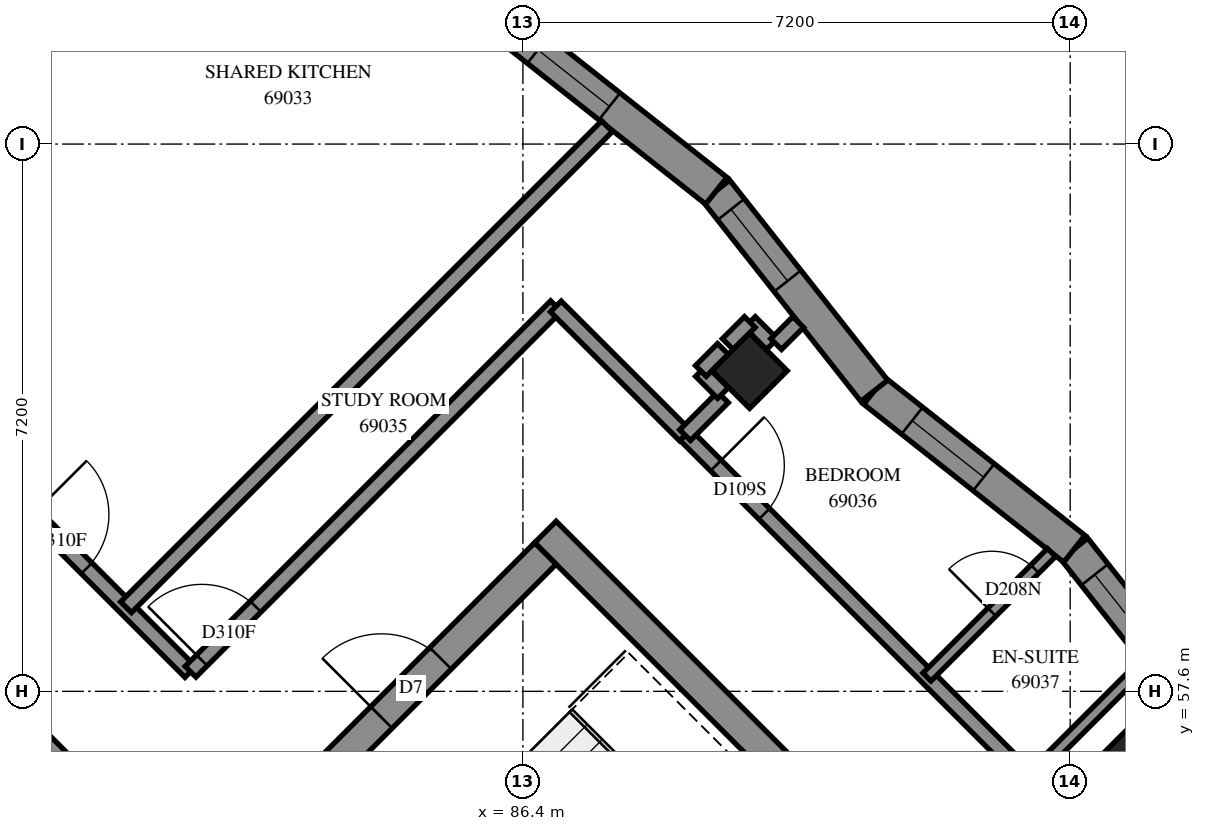
"""IFC4 building model, lengths in metres.
Left out: names, types, materials, properties, quantities, classifications, styles, units other than length and angle.
Written with IfcOpenShell. Run it as: python <this file> out.ifc"""

import sys

from ifc_helpers import new_model, si_unit, direction, frame, frame_2d, origin, origin_2d, place, context, subcontext, project, spatial, polyline, rectangle, outline, extrude, element, fill, save


model = new_model("IFC4")
c1 = context("Model", 3, precision=1e-05, world=origin(), true_north=direction((0.0, 1.0)))
c2 = subcontext(c1, "Body", "Model", "MODEL_VIEW")
j1 = project(units=[si_unit("LENGTHUNIT", "METRE"), si_unit("PLANEANGLEUNIT", "RADIAN")], contexts=[c1])
p1 = place(None, origin())
s1 = spatial("IfcSite", under=j1, at=p1, CompositionType="ELEMENT")
p2 = place(p1, origin())
s2 = spatial("IfcBuilding", under=s1, at=p2, CompositionType="ELEMENT")
p3 = place(p2, frame((0.0, 0.0, 254.0)))
s3 = spatial("IfcBuildingStorey", under=s2, at=p3, CompositionType="ELEMENT", Elevation=254.0)
for number, where, z_axis, x_axis in (
    (1, (89.382, 61.818, 0.0), (0.0, 0.0, 1.0), (0.707, -0.707, 0.0)),
    (2, (94.474, 56.727, 0.0), (0.0, 0.0, 1.0), (0.707, -0.707, 0.0)),
):
    element("IfcColumn", number, at=place(p3, frame(where, z_axis=z_axis, x_axis=x_axis)), inside=s3, PredefinedType="COLUMN", context=c2, shape_type="SweptSolid", body=[
        extrude(rectangle(XDim=0.7, YDim=0.7, at=origin_2d()), origin(), (0.0, 0.0, 1.0), 3.1),
    ])
p4 = place(p3, frame((86.695, 59.696, -0.3), z_axis=(0.0, 0.0, 1.0), x_axis=(0.7071100706, -0.7071034917, 0.0)))
e3 = element("IfcWall", 3, at=p4, inside=s3, PredefinedType="SHEAR", context=c2, shape_type="SweptSolid", body=[
    extrude(rectangle(XDim=15.2, YDim=0.4, at=frame_2d((7.6, 0.0))), origin(), (0.0, 0.0, 1.0), 2.7),
])
p5 = place(p4, frame((10.4, 0.0, 0.3)))
e4 = element("IfcOpeningElement", 4, at=p5, cuts=e3, PredefinedType="OPENING", context=c2, shape_type="SweptSolid", body=[
    extrude(rectangle(XDim=0.8, YDim=2.1, at=frame_2d((0.4, 1.05))), frame((0.0, 0.21, 0.0), z_axis=(0.0, -1.0, 0.0), x_axis=(1.0, 0.0, 0.0)), (0.0, 0.0, 1.0), 0.42),
])
p6 = place(p3, frame((76.513, 49.231, -0.3), z_axis=(0.0, 0.0, 1.0), x_axis=(0.7071067812, 0.7071067812, 0.0)))
e5 = element("IfcWall", 5, at=p6, inside=s3, PredefinedType="SHEAR", context=c2, shape_type="SweptSolid", body=[
    extrude(rectangle(XDim=14.4, YDim=0.4, at=frame_2d((7.2, 0.0))), origin(), (0.0, 0.0, 1.0), 2.7),
])
p7 = place(p6, frame((4.55, 0.0, 0.3)))
e6 = element("IfcOpeningElement", 6, at=p7, cuts=e5, PredefinedType="OPENING", context=c2, shape_type="SweptSolid", body=[
    extrude(rectangle(XDim=1.1, YDim=2.1, at=frame_2d((0.55, 1.05))), frame((0.0, 0.21, 0.0), z_axis=(0.0, -1.0, 0.0), x_axis=(1.0, 0.0, 0.0)), (0.0, 0.0, 1.0), 0.42),
])
p8 = place(p6, frame((11.35, 0.0, 0.3)))
e7 = element("IfcOpeningElement", 7, at=p8, cuts=e5, PredefinedType="OPENING", context=c2, shape_type="SweptSolid", body=[
    extrude(rectangle(XDim=1.1, YDim=2.1, at=frame_2d((0.55, 1.05))), frame((0.0, 0.21, 0.0), z_axis=(0.0, -1.0, 0.0), x_axis=(1.0, 0.0, 0.0)), (0.0, 0.0, 1.0), 0.42),
])
p9 = place(p3, frame((95.733, 56.844, 0.0), z_axis=(0.0, 0.0, 1.0), x_axis=(-0.6198356984, 0.7847316147, 0.0)))
e8 = element("IfcWall", 8, at=p9, inside=s3, PredefinedType="SOLIDWALL", context=c2, shape_type="SweptSolid", body=[
    extrude(outline(polyline([(0.026, -0.225), (3.38, -0.225), (3.327, 0.225), (-0.026, 0.225), (0.026, -0.225)])), origin(), (0.0, 0.0, 1.0), 3.1),
])
p10 = place(p9, frame((1.72, 0.0, 0.45)))
e9 = element("IfcOpeningElement", 9, at=p10, cuts=e8, PredefinedType="OPENING", context=c2, shape_type="SweptSolid", body=[
    extrude(rectangle(XDim=1.2, YDim=2.55, at=frame_2d((0.6, 1.275))), frame((0.0, 0.235, 0.0), z_axis=(0.0, -1.0, 0.0), x_axis=(1.0, 0.0, 0.0)), (0.0, 0.0, 1.0), 0.47),
])
p11 = place(p3, frame((93.654, 59.475, 0.0), z_axis=(0.0, 0.0, 1.0), x_axis=(-0.7847316147, 0.6198356984, 0.0)))
e10 = element("IfcWall", 10, at=p11, inside=s3, PredefinedType="SOLIDWALL", context=c2, shape_type="SweptSolid", body=[
    extrude(outline(polyline([(-0.026, -0.225), (3.327, -0.225), (3.38, 0.225), (0.026, 0.225), (-0.026, -0.225)])), origin(), (0.0, 0.0, 1.0), 3.1),
])
p12 = place(p11, frame((1.519, 0.0, 0.45)))
e11 = element("IfcOpeningElement", 11, at=p12, cuts=e10, PredefinedType="OPENING", context=c2, shape_type="SweptSolid", body=[
    extrude(rectangle(XDim=1.2, YDim=2.55, at=frame_2d((0.6, 1.275))), frame((0.0, 0.235, 0.0), z_axis=(0.0, -1.0, 0.0), x_axis=(1.0, 0.0, 0.0)), (0.0, 0.0, 1.0), 0.47),
])
p13 = place(p3, frame((91.023, 61.554, 0.0), z_axis=(0.0, 0.0, 1.0), x_axis=(-0.6198356984, 0.7847316147, 0.0)))
e12 = element("IfcWall", 12, at=p13, inside=s3, PredefinedType="SOLIDWALL", context=c2, shape_type="SweptSolid", body=[
    extrude(outline(polyline([(0.026, -0.225), (3.38, -0.225), (3.327, 0.225), (-0.026, 0.225), (0.026, -0.225)])), origin(), (0.0, 0.0, 1.0), 3.1),
])
p14 = place(p13, frame((1.841, 0.0, 0.45)))
e13 = element("IfcOpeningElement", 13, at=p14, cuts=e12, PredefinedType="OPENING", context=c2, shape_type="SweptSolid", body=[
    extrude(rectangle(XDim=1.2, YDim=2.55, at=frame_2d((0.6, 1.275))), frame((0.0, 0.235, 0.0), z_axis=(0.0, -1.0, 0.0), x_axis=(1.0, 0.0, 0.0)), (0.0, 0.0, 1.0), 0.47),
])
p15 = place(p3, frame((88.944, 64.186, 0.0), z_axis=(0.0, 0.0, 1.0), x_axis=(-0.7847316147, 0.6198356984, 0.0)))
e14 = element("IfcWall", 14, at=p15, inside=s3, PredefinedType="SOLIDWALL", context=c2, shape_type="SweptSolid", body=[
    extrude(outline(polyline([(-0.026, -0.225), (3.327, -0.225), (3.38, 0.225), (0.026, 0.225), (-0.026, -0.225)])), origin(), (0.0, 0.0, 1.0), 3.1),
])
p16 = place(p15, frame((1.79, 0.0, 0.45)))
e15 = element("IfcOpeningElement", 15, at=p16, cuts=e14, PredefinedType="OPENING", context=c2, shape_type="SweptSolid", body=[
    extrude(rectangle(XDim=1.2, YDim=2.55, at=frame_2d((0.6, 1.275))), frame((0.0, 0.235, 0.0), z_axis=(0.0, -1.0, 0.0), x_axis=(1.0, 0.0, 0.0)), (0.0, 0.0, 1.0), 0.47),
])
p17 = place(p3, frame((74.397, 65.483, 0.0), z_axis=(0.0, 0.0, 1.0), x_axis=(0.7071067812, -0.7071067812, 0.0)))
e16 = element("IfcWall", 16, at=p17, inside=s3, PredefinedType="PARTITIONING", context=c2, shape_type="SweptSolid", body=[
    extrude(rectangle(XDim=10.788, YDim=0.2, at=frame_2d((5.394, 0.0))), origin(), (0.0, 0.0, 1.0), 3.1),
])
p18 = place(p17, frame((5.083, 0.0, 0.0)))
e17 = element("IfcOpeningElement", 17, at=p18, cuts=e16, PredefinedType="OPENING", context=c2, shape_type="SweptSolid", body=[
    extrude(rectangle(XDim=1.0, YDim=2.1, at=frame_2d((0.5, 1.05))), frame((0.0, 0.11, 0.0), z_axis=(0.0, -1.0, 0.0), x_axis=(1.0, 0.0, 0.0)), (0.0, 0.0, 1.0), 0.22),
])
p19 = place(p17, frame((7.858, 0.0, 0.0)))
e18 = element("IfcOpeningElement", 18, at=p19, cuts=e16, PredefinedType="OPENING", context=c2, shape_type="SweptSolid", body=[
    extrude(rectangle(XDim=1.0, YDim=2.1, at=frame_2d((0.5, 1.05))), frame((0.0, 0.11, 0.0), z_axis=(0.0, -1.0, 0.0), x_axis=(1.0, 0.0, 0.0)), (0.0, 0.0, 1.0), 0.22),
])
p20 = place(p3, frame((81.179, 58.707, 0.0), z_axis=(0.0, 0.0, 1.0), x_axis=(0.7071123688, 0.7071011936, 0.0)))
e19 = element("IfcWall", 19, at=p20, inside=s3, PredefinedType="PARTITIONING", context=c2, shape_type="SweptSolid", body=[
    extrude(rectangle(XDim=8.948, YDim=0.2, at=frame_2d((4.474, 0.0))), origin(), (0.0, 0.0, 1.0), 3.1),
])
p21 = place(p3, frame((82.028, 57.858, 0.0), z_axis=(0.0, 0.0, 1.0), x_axis=(0.7071067812, 0.7071067812, 0.0)))
e20 = element("IfcWall", 20, at=p21, inside=s3, PredefinedType="PARTITIONING", context=c2, shape_type="SweptSolid", body=[
    extrude(rectangle(XDim=6.8, YDim=0.2, at=frame_2d((3.4, 0.0))), origin(), (0.0, 0.0, 1.0), 3.1),
])
p22 = place(p21, frame((0.211, 0.0, 0.0)))
e21 = element("IfcOpeningElement", 21, at=p22, cuts=e20, PredefinedType="OPENING", context=c2, shape_type="SweptSolid", body=[
    extrude(rectangle(XDim=1.0, YDim=2.1, at=frame_2d((0.5, 1.05))), frame((0.0, 0.11, 0.0), z_axis=(0.0, -1.0, 0.0), x_axis=(1.0, 0.0, 0.0)), (0.0, 0.0, 1.0), 0.22),
])
p23 = place(p3, frame((88.537, 60.973, 0.0), z_axis=(0.0, 0.0, 1.0), x_axis=(0.7071067812, -0.7071067812, 0.0)))
e22 = element("IfcWall", 22, at=p23, inside=s3, PredefinedType="PARTITIONING", context=c2, shape_type="SweptSolid", body=[
    extrude(rectangle(XDim=6.401, YDim=0.2, at=frame_2d((3.2, 0.0))), origin(), (0.0, 0.0, 1.0), 3.1),
])
p24 = place(p23, frame((0.569, 0.0, 0.0)))
e23 = element("IfcOpeningElement", 23, at=p24, cuts=e22, PredefinedType="OPENING", context=c2, shape_type="SweptSolid", body=[
    extrude(rectangle(XDim=0.9, YDim=2.1, at=frame_2d((0.45, 1.05))), frame((0.0, 0.11, 0.0), z_axis=(0.0, -1.0, 0.0), x_axis=(1.0, 0.0, 0.0)), (0.0, 0.0, 1.0), 0.22),
])
p25 = place(p3, frame((86.833, 62.663, 0.0), z_axis=(0.0, 0.0, 1.0), x_axis=(0.7075233388, -0.706689978, 0.0)))
e24 = element("IfcWall", 24, at=p25, inside=s3, PredefinedType="PARTITIONING", context=c2, shape_type="SweptSolid", body=[
    extrude(rectangle(XDim=2.4, YDim=0.2, at=frame_2d((1.2, 0.0))), origin(), (0.0, 0.0, 1.0), 3.1),
])
p26 = place(p3, frame((91.716, 57.788, 0.0), z_axis=(0.0, 0.0, 1.0), x_axis=(0.7070851944, 0.7071283673, 0.0)))
e25 = element("IfcWall", 25, at=p26, inside=s3, PredefinedType="PARTITIONING", context=c2, shape_type="SweptSolid", body=[
    extrude(rectangle(XDim=2.316, YDim=0.15, at=frame_2d((1.158, 0.0))), origin(), (0.0, 0.0, 1.0), 3.1),
])
p27 = place(p26, frame((1.209, 0.0, 0.0)))
e26 = element("IfcOpeningElement", 26, at=p27, cuts=e25, PredefinedType="OPENING", context=c2, shape_type="SweptSolid", body=[
    extrude(rectangle(XDim=0.8, YDim=2.1, at=frame_2d((0.4, 1.05))), frame((0.0, 0.085, 0.0), z_axis=(0.0, -1.0, 0.0), x_axis=(1.0, 0.0, 0.0)), (0.0, 0.0, 1.0), 0.17),
])
p28 = place(p3, frame((93.059, 56.445, 0.0), z_axis=(0.0, 0.0, 1.0), x_axis=(0.7071067812, 0.7071067812, 0.0)))
e27 = element("IfcWall", 27, at=p28, inside=s3, PredefinedType="PARTITIONING", context=c2, shape_type="SweptSolid", body=[
    extrude(rectangle(XDim=2.135, YDim=0.15, at=frame_2d((1.067, 0.0))), origin(), (0.0, 0.0, 1.0), 3.1),
])
p29 = place(p3, frame((79.547, 57.505, 0.0), z_axis=(0.0, 0.0, 1.0), x_axis=(0.7071067812, -0.7071067812, 0.0)))
e28 = element("IfcWall", 28, at=p29, inside=s3, PredefinedType="PARTITIONING", context=c2, shape_type="SweptSolid", body=[
    extrude(rectangle(XDim=1.505, YDim=0.2, at=frame_2d((0.752, 0.0))), origin(), (0.0, 0.0, 1.0), 3.1),
])
p30 = place(p3, frame((88.534, 60.971, 0.0), z_axis=(0.0, 0.0, 1.0), x_axis=(0.7071067812, 0.7071067812, 0.0)))
e29 = element("IfcWall", 29, at=p30, inside=s3, PredefinedType="PARTITIONING", context=c2, shape_type="SweptSolid", body=[
    extrude(rectangle(XDim=0.704, YDim=0.2, at=frame_2d((0.352, 0.0))), origin(), (0.0, 0.0, 1.0), 3.1),
])
for number, where, z_axis, x_axis in (
    (30, (88.743, 61.815, 0.0), (0.0, 0.0, 1.0), (0.707, -0.707, 0.0)),
    (31, (89.386, 62.458, 0.0), (0.0, 0.0, 1.0), (0.707, -0.707, 0.0)),
    (32, (88.741, 61.815, 0.0), (0.0, 0.0, 1.0), (0.707, 0.707, 0.0)),
    (33, (89.095, 62.169, 0.0), (0.0, 0.0, 1.0), (0.707, 0.707, 0.0)),
    (34, (89.731, 62.169, 0.0), (0.0, 0.0, 1.0), (0.707, 0.707, 0.0)),
):
    element("IfcWall", number, at=place(p3, frame(where, z_axis=z_axis, x_axis=x_axis)), inside=s3, PredefinedType="PARTITIONING", context=c2, shape_type="SweptSolid", body=[
        extrude(rectangle(XDim=0.41, YDim=0.2, at=frame_2d((0.205, 0.0))), origin(), (0.0, 0.0, 1.0), 3.1),
    ])
p31 = place(p10, origin())
e35 = element("IfcWindow", 35, at=p31, inside=s3, PartitioningType="SINGLE_PANEL", PredefinedType="WINDOW", context=c2, shape_type="SweptSolid", body=[
    extrude(rectangle(XDim=1.2, YDim=2.55, at=frame_2d((0.6, 1.275))), frame((0.0, 0.205, 0.0), z_axis=(0.0, -1.0, 0.0), x_axis=(1.0, 0.0, 0.0)), (0.0, 0.0, 1.0), 0.06),
])
fill(e9, e35)
p32 = place(p12, origin())
e36 = element("IfcWindow", 36, at=p32, inside=s3, PartitioningType="SINGLE_PANEL", PredefinedType="WINDOW", context=c2, shape_type="SweptSolid", body=[
    extrude(rectangle(XDim=1.2, YDim=2.55, at=frame_2d((0.6, 1.275))), frame((0.0, 0.205, 0.0), z_axis=(0.0, -1.0, 0.0), x_axis=(1.0, 0.0, 0.0)), (0.0, 0.0, 1.0), 0.06),
])
fill(e11, e36)
p33 = place(p14, origin())
e37 = element("IfcWindow", 37, at=p33, inside=s3, PartitioningType="SINGLE_PANEL", PredefinedType="WINDOW", context=c2, shape_type="SweptSolid", body=[
    extrude(rectangle(XDim=1.2, YDim=2.55, at=frame_2d((0.6, 1.275))), frame((0.0, 0.205, 0.0), z_axis=(0.0, -1.0, 0.0), x_axis=(1.0, 0.0, 0.0)), (0.0, 0.0, 1.0), 0.06),
])
fill(e13, e37)
p34 = place(p16, origin())
e38 = element("IfcWindow", 38, at=p34, inside=s3, PartitioningType="SINGLE_PANEL", PredefinedType="WINDOW", context=c2, shape_type="SweptSolid", body=[
    extrude(rectangle(XDim=1.2, YDim=2.55, at=frame_2d((0.6, 1.275))), frame((0.0, 0.205, 0.0), z_axis=(0.0, -1.0, 0.0), x_axis=(1.0, 0.0, 0.0)), (0.0, 0.0, 1.0), 0.06),
])
fill(e15, e38)
p35 = place(p8, origin())
e39 = element("IfcDoor", 39, at=p35, inside=s3, OperationType="SINGLE_SWING_LEFT", PredefinedType="DOOR", context=c2, shape_type="SweptSolid", body=[
    extrude(rectangle(XDim=1.1, YDim=2.1, at=frame_2d((0.55, 1.05))), frame((0.0, 0.025, 0.0), z_axis=(0.0, -1.0, 0.0), x_axis=(1.0, 0.0, 0.0)), (0.0, 0.0, 1.0), 0.05),
])
fill(e7, e39)
p36 = place(p19, origin())
e40 = element("IfcDoor", 40, at=p36, inside=s3, OperationType="SINGLE_SWING_LEFT", PredefinedType="DOOR", context=c2, shape_type="SweptSolid", body=[
    extrude(rectangle(XDim=1.0, YDim=2.1, at=frame_2d((0.5, 1.05))), frame((0.0, 0.025, 0.0), z_axis=(0.0, -1.0, 0.0), x_axis=(1.0, 0.0, 0.0)), (0.0, 0.0, 1.0), 0.05),
])
fill(e18, e40)
p37 = place(p22, origin())
e41 = element("IfcDoor", 41, at=p37, inside=s3, OperationType="SINGLE_SWING_RIGHT", PredefinedType="DOOR", context=c2, shape_type="SweptSolid", body=[
    extrude(rectangle(XDim=1.0, YDim=2.1, at=frame_2d((0.5, 1.05))), frame((0.0, 0.025, 0.0), z_axis=(0.0, -1.0, 0.0), x_axis=(1.0, 0.0, 0.0)), (0.0, 0.0, 1.0), 0.05),
])
fill(e21, e41)
p38 = place(p24, origin())
e42 = element("IfcDoor", 42, at=p38, inside=s3, OperationType="SINGLE_SWING_LEFT", PredefinedType="DOOR", context=c2, shape_type="SweptSolid", body=[
    extrude(rectangle(XDim=0.9, YDim=2.1, at=frame_2d((0.45, 1.05))), frame((0.0, 0.025, 0.0), z_axis=(0.0, -1.0, 0.0), x_axis=(1.0, 0.0, 0.0)), (0.0, 0.0, 1.0), 0.05),
])
fill(e23, e42)
p39 = place(p27, origin())
e43 = element("IfcDoor", 43, at=p39, inside=s3, OperationType="SINGLE_SWING_RIGHT", PredefinedType="DOOR", context=c2, shape_type="SweptSolid", body=[
    extrude(rectangle(XDim=0.8, YDim=2.1, at=frame_2d((0.4, 1.05))), frame((0.0, 0.025, 0.0), z_axis=(0.0, -1.0, 0.0), x_axis=(1.0, 0.0, 0.0)), (0.0, 0.0, 1.0), 0.05),
])
fill(e26, e43)
save(model, sys.argv[1])
